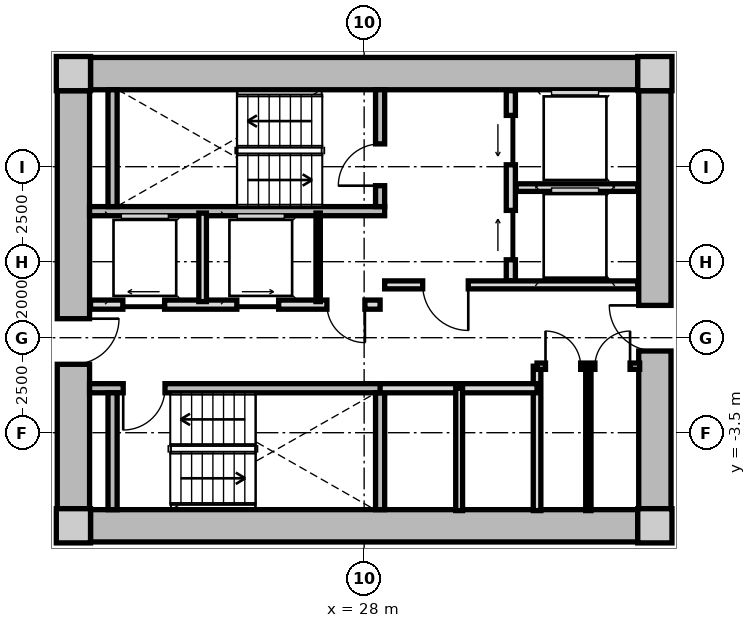
"""IFC4 building model, lengths in metres.
Left out: names, types, materials, properties, quantities, classifications, styles, units other than length and angle.
Written with IfcOpenShell. Run it as: python <this file> out.ifc"""

import sys

from ifc_helpers import new_model, si_unit, direction, frame, frame_2d, origin, origin_2d, place, context, subcontext, project, spatial, rectangle, extrude, source, transform, mapped, element, fill, save


model = new_model("IFC4")
c1 = context("Model", 3, precision=1e-05, world=origin(), true_north=direction((0.0, 1.0)))
c2 = subcontext(c1, "Body", "Model", "MODEL_VIEW")
j1 = project(units=[si_unit("LENGTHUNIT", "METRE"), si_unit("PLANEANGLEUNIT", "RADIAN")], contexts=[c1])
p1 = place(None, origin())
s1 = spatial("IfcSite", under=j1, at=p1, CompositionType="ELEMENT")
p2 = place(p1, origin())
s2 = spatial("IfcBuilding", under=s1, at=p2, CompositionType="ELEMENT")
p3 = place(p2, frame((0.0, 0.0, 67.35)))
s3 = spatial("IfcBuildingStorey", under=s2, at=p3, CompositionType="ELEMENT", Elevation=67.35)
m1 = source(origin(), c2, "Body", "SweptSolid", [
    extrude(rectangle(XDim=0.9, YDim=0.9, at=origin_2d()), origin(), (0.0, 0.0, 1.0), 3.05),
])
for number, where, z_axis, x_axis in (
    (1, (20.35, -5.95, 0.0), (0.0, 0.0, 1.0), (1.0, 0.0, 0.0)),
    (2, (35.65, -5.95, 0.0), (0.0, 0.0, 1.0), (1.0, 0.0, 0.0)),
    (3, (35.65, 5.95, 0.0), (0.0, 0.0, 1.0), (1.0, 0.0, 0.0)),
    (4, (20.35, 5.95, 0.0), (0.0, 0.0, 1.0), (1.0, 0.0, 0.0)),
):
    element("IfcColumn", number, at=place(p3, frame(where, z_axis=z_axis, x_axis=x_axis)), inside=s3, PredefinedType="COLUMN", context=c2, shape_type="MappedRepresentation", body=[
        mapped(m1, transform((0.0, 0.0, 0.0), x_axis=(1.0, 0.0, 0.0), y_axis=(0.0, 1.0, 0.0), z_axis=(0.0, 0.0, 1.0), scale=1.0)),
    ])
m2 = source(origin(), c2, "Body", "SweptSolid", [
    extrude(rectangle(XDim=14.4, YDim=0.85, at=frame_2d((7.2, 0.0))), origin(), (0.0, 0.0, 1.0), 2.79),
])
for number, where, z_axis, x_axis in (
    (5, (20.8, 5.95, 0.0), (0.0, 0.0, 1.0), (1.0, 0.0, 0.0)),
    (6, (35.2, -5.95, 0.0), (0.0, 0.0, 1.0), (-1.0, 0.0, 0.0)),
):
    element("IfcWall", number, at=place(p3, frame(where, z_axis=z_axis, x_axis=x_axis)), inside=s3, PredefinedType="SHEAR", context=c2, shape_type="MappedRepresentation", body=[
        mapped(m2, transform((0.0, 0.0, 0.0), x_axis=(1.0, 0.0, 0.0), y_axis=(0.0, 1.0, 0.0), z_axis=(0.0, 0.0, 1.0), scale=1.0)),
    ])
m3 = source(origin(), c2, "Body", "SweptSolid", [
    extrude(rectangle(XDim=11.0, YDim=0.85, at=frame_2d((5.5, 0.0))), origin(), (0.0, 0.0, 1.0), 2.79),
])
p4 = place(p3, frame((20.35, -5.5, 0.0), z_axis=(0.0, 0.0, 1.0), x_axis=(0.0, 1.0, 0.0)))
e7 = element("IfcWall", 7, at=p4, inside=s3, PredefinedType="SHEAR", context=c2, shape_type="MappedRepresentation", body=[
    mapped(m3, transform((0.0, 0.0, 0.0), x_axis=(1.0, 0.0, 0.0), y_axis=(0.0, 1.0, 0.0), z_axis=(0.0, 0.0, 1.0), scale=1.0)),
])
p5 = place(p4, frame((3.8, 0.0, 0.0)))
e8 = element("IfcOpeningElement", 8, at=p5, cuts=e7, PredefinedType="OPENING", context=c2, shape_type="SweptSolid", body=[
    extrude(rectangle(XDim=1.2, YDim=2.15, at=frame_2d((0.6, 1.075))), frame((0.0, 0.435, 0.0), z_axis=(0.0, -1.0, 0.0), x_axis=(1.0, 0.0, 0.0)), (0.0, 0.0, 1.0), 0.87),
])
p6 = place(p3, frame((35.65, 5.5, 0.0), z_axis=(0.0, 0.0, 1.0), x_axis=(0.0, -1.0, 0.0)))
e9 = element("IfcWall", 9, at=p6, inside=s3, PredefinedType="SHEAR", context=c2, shape_type="MappedRepresentation", body=[
    mapped(m3, transform((0.0, 0.0, 0.0), x_axis=(1.0, 0.0, 0.0), y_axis=(0.0, 1.0, 0.0), z_axis=(0.0, 0.0, 1.0), scale=1.0)),
])
p7 = place(p6, frame((5.65, 0.0, 0.0)))
e10 = element("IfcOpeningElement", 10, at=p7, cuts=e9, PredefinedType="OPENING", context=c2, shape_type="SweptSolid", body=[
    extrude(rectangle(XDim=1.2, YDim=2.15, at=frame_2d((0.6, 1.075))), frame((0.0, 0.435, 0.0), z_axis=(0.0, -1.0, 0.0), x_axis=(1.0, 0.0, 0.0)), (0.0, 0.0, 1.0), 0.87),
])
m4 = source(origin(), c2, "Body", "SweptSolid", [
    extrude(rectangle(XDim=7.765, YDim=0.24, at=frame_2d((3.883, 0.0))), origin(), (0.0, 0.0, 1.0), 2.79),
])
p8 = place(p3, frame((20.775, 2.33, 0.0), z_axis=(0.0, 0.0, 1.0), x_axis=(1.0, 0.0, 0.0)))
e11 = element("IfcWall", 11, at=p8, inside=s3, PredefinedType="PARTITIONING", context=c2, shape_type="MappedRepresentation", body=[
    mapped(m4, transform((0.0, 0.0, 0.0), x_axis=(1.0, 0.0, 0.0), y_axis=(0.0, 1.0, 0.0), z_axis=(0.0, 0.0, 1.0), scale=1.0)),
])
m5 = source(origin(), c2, "Body", "SweptSolid", [
    extrude(rectangle(XDim=3.075, YDim=0.24, at=frame_2d((1.538, 0.0))), origin(), (0.0, 0.0, 1.0), 2.79),
])
p9 = place(p3, frame((21.38, 2.45, 0.0), z_axis=(0.0, 0.0, 1.0), x_axis=(0.0, 1.0, 0.0)))
e12 = element("IfcWall", 12, at=p9, inside=s3, PredefinedType="PARTITIONING", context=c2, shape_type="MappedRepresentation", body=[
    mapped(m5, transform((0.0, 0.0, 0.0), x_axis=(1.0, 0.0, 0.0), y_axis=(0.0, 1.0, 0.0), z_axis=(0.0, 0.0, 1.0), scale=1.0)),
])
p10 = place(p3, frame((28.42, 2.45, 0.0), z_axis=(0.0, 0.0, 1.0), x_axis=(0.0, 1.0, 0.0)))
e13 = element("IfcWall", 13, at=p10, inside=s3, PredefinedType="PARTITIONING", context=c2, shape_type="MappedRepresentation", body=[
    mapped(m5, transform((0.0, 0.0, 0.0), x_axis=(1.0, 0.0, 0.0), y_axis=(0.0, 1.0, 0.0), z_axis=(0.0, 0.0, 1.0), scale=1.0)),
])
p11 = place(p10, frame((0.55, 0.0, 0.0)))
e14 = element("IfcOpeningElement", 14, at=p11, cuts=e13, PredefinedType="OPENING", context=c2, shape_type="SweptSolid", body=[
    extrude(rectangle(XDim=1.1, YDim=2.15, at=frame_2d((0.55, 1.075))), frame((0.0, 0.13, 0.0), z_axis=(0.0, -1.0, 0.0), x_axis=(1.0, 0.0, 0.0)), (0.0, 0.0, 1.0), 0.26),
])
p12 = place(p3, frame((20.775, -2.33, 0.0), z_axis=(0.0, 0.0, 1.0), x_axis=(1.0, 0.0, 0.0)))
e15 = element("IfcWall", 15, at=p12, inside=s3, PredefinedType="PARTITIONING", context=c2, shape_type="MappedRepresentation", body=[
    mapped(m4, transform((0.0, 0.0, 0.0), x_axis=(1.0, 0.0, 0.0), y_axis=(0.0, 1.0, 0.0), z_axis=(0.0, 0.0, 1.0), scale=1.0)),
])
p13 = place(p12, frame((0.885, 0.0, 0.0)))
e16 = element("IfcOpeningElement", 16, at=p13, cuts=e15, PredefinedType="OPENING", context=c2, shape_type="SweptSolid", body=[
    extrude(rectangle(XDim=1.1, YDim=2.15, at=frame_2d((0.55, 1.075))), frame((0.0, 0.13, 0.0), z_axis=(0.0, -1.0, 0.0), x_axis=(1.0, 0.0, 0.0)), (0.0, 0.0, 1.0), 0.26),
])
for number, where, z_axis, x_axis in (
    (17, (21.38, -5.525, 0.0), (0.0, 0.0, 1.0), (0.0, 1.0, 0.0)),
    (18, (28.42, -5.525, 0.0), (0.0, 0.0, 1.0), (0.0, 1.0, 0.0)),
):
    element("IfcWall", number, at=place(p3, frame(where, z_axis=z_axis, x_axis=x_axis)), inside=s3, PredefinedType="PARTITIONING", context=c2, shape_type="MappedRepresentation", body=[
        mapped(m5, transform((0.0, 0.0, 0.0), x_axis=(1.0, 0.0, 0.0), y_axis=(0.0, 1.0, 0.0), z_axis=(0.0, 0.0, 1.0), scale=1.0)),
    ])
m6 = source(origin(), c2, "Body", "SweptSolid", [
    extrude(rectangle(XDim=5.0, YDim=0.24, at=frame_2d((2.5, 0.0))), origin(), (0.0, 0.0, 1.0), 2.775),
])
p14 = place(p3, frame((31.86, 0.5, 0.0), z_axis=(0.0, 0.0, 1.0), x_axis=(0.0, 1.0, 0.0)))
e19 = element("IfcWall", 19, at=p14, inside=s3, PredefinedType="PARTITIONING", context=c2, shape_type="MappedRepresentation", body=[
    mapped(m6, transform((0.0, 0.0, 0.0), x_axis=(1.0, 0.0, 0.0), y_axis=(0.0, 1.0, 0.0), z_axis=(0.0, 0.0, 1.0), scale=1.0)),
])
p15 = place(p14, frame((3.05, 0.0, 0.0)))
e20 = element("IfcOpeningElement", 20, at=p15, cuts=e19, PredefinedType="OPENING", context=c2, shape_type="SweptSolid", body=[
    extrude(rectangle(XDim=1.3, YDim=2.2, at=frame_2d((0.65, 1.1))), frame((0.0, 0.13, 0.0), z_axis=(0.0, -1.0, 0.0), x_axis=(1.0, 0.0, 0.0)), (0.0, 0.0, 1.0), 0.26),
])
p16 = place(p14, frame((0.55, 0.0, 0.0)))
e21 = element("IfcOpeningElement", 21, at=p16, cuts=e19, PredefinedType="OPENING", context=c2, shape_type="SweptSolid", body=[
    extrude(rectangle(XDim=1.3, YDim=2.2, at=frame_2d((0.65, 1.1))), frame((0.0, 0.13, 0.0), z_axis=(0.0, -1.0, 0.0), x_axis=(1.0, 0.0, 0.0)), (0.0, 0.0, 1.0), 0.26),
])
m7 = source(origin(), c2, "Body", "SweptSolid", [
    extrude(rectangle(XDim=3.2, YDim=0.2, at=frame_2d((1.6, 0.0))), origin(), (0.0, 0.0, 1.0), 2.775),
])
p17 = place(p3, frame((32.0, 2.95, 0.0), z_axis=(0.0, 0.0, 1.0), x_axis=(1.0, 0.0, 0.0)))
e22 = element("IfcWall", 22, at=p17, inside=s3, PredefinedType="PARTITIONING", context=c2, shape_type="MappedRepresentation", body=[
    mapped(m7, transform((0.0, 0.0, 0.0), x_axis=(1.0, 0.0, 0.0), y_axis=(0.0, 1.0, 0.0), z_axis=(0.0, 0.0, 1.0), scale=1.0)),
])
m8 = source(origin(), c2, "Body", "SweptSolid", [
    extrude(rectangle(XDim=6.66, YDim=0.21, at=frame_2d((3.33, 0.0))), origin(), (0.0, 0.0, 1.0), 2.775),
])
p18 = place(p3, frame((28.54, 0.39, 0.0), z_axis=(0.0, 0.0, 1.0), x_axis=(1.0, 0.0, 0.0)))
e23 = element("IfcWall", 23, at=p18, inside=s3, PredefinedType="PARTITIONING", context=c2, shape_type="MappedRepresentation", body=[
    mapped(m8, transform((0.0, 0.0, 0.0), x_axis=(1.0, 0.0, 0.0), y_axis=(0.0, 1.0, 0.0), z_axis=(0.0, 0.0, 1.0), scale=1.0)),
])
p19 = place(p18, frame((1.0, 0.0, 0.0)))
e24 = element("IfcOpeningElement", 24, at=p19, cuts=e23, PredefinedType="OPENING", context=c2, shape_type="SweptSolid", body=[
    extrude(rectangle(XDim=1.2, YDim=2.15, at=frame_2d((0.6, 1.075))), frame((0.0, 0.115, 0.0), z_axis=(0.0, -1.0, 0.0), x_axis=(1.0, 0.0, 0.0)), (0.0, 0.0, 1.0), 0.23),
])
m9 = source(origin(), c2, "Body", "SweptSolid", [
    extrude(rectangle(XDim=7.62, YDim=0.24, at=frame_2d((3.81, 0.0))), origin(), (0.0, 0.0, 1.0), 2.775),
])
p20 = place(p3, frame((20.8, -0.13, 0.0), z_axis=(0.0, 0.0, 1.0), x_axis=(1.0, 0.0, 0.0)))
e25 = element("IfcWall", 25, at=p20, inside=s3, PredefinedType="PARTITIONING", context=c2, shape_type="MappedRepresentation", body=[
    mapped(m9, transform((0.0, 0.0, 0.0), x_axis=(1.0, 0.0, 0.0), y_axis=(0.0, 1.0, 0.0), z_axis=(0.0, 0.0, 1.0), scale=1.0)),
])
p21 = place(p20, frame((6.22, 0.0, 0.0)))
e26 = element("IfcOpeningElement", 26, at=p21, cuts=e25, PredefinedType="OPENING", context=c2, shape_type="SweptSolid", body=[
    extrude(rectangle(XDim=1.0, YDim=2.1, at=frame_2d((0.5, 1.05))), frame((0.0, 0.13, 0.0), z_axis=(0.0, -1.0, 0.0), x_axis=(1.0, 0.0, 0.0)), (0.0, 0.0, 1.0), 0.26),
])
p22 = place(p20, frame((0.85, 0.0, 0.0)))
e27 = element("IfcOpeningElement", 27, at=p22, cuts=e25, PredefinedType="OPENING", context=c2, shape_type="SweptSolid", body=[
    extrude(rectangle(XDim=1.1, YDim=2.2, at=frame_2d((0.55, 1.1))), frame((0.0, 0.13, 0.0), z_axis=(0.0, -1.0, 0.0), x_axis=(1.0, 0.0, 0.0)), (0.0, 0.0, 1.0), 0.26),
])
p23 = place(p20, frame((3.85, 0.0, 0.0)))
e28 = element("IfcOpeningElement", 28, at=p23, cuts=e25, PredefinedType="OPENING", context=c2, shape_type="SweptSolid", body=[
    extrude(rectangle(XDim=1.1, YDim=2.2, at=frame_2d((0.55, 1.1))), frame((0.0, 0.13, 0.0), z_axis=(0.0, -1.0, 0.0), x_axis=(1.0, 0.0, 0.0)), (0.0, 0.0, 1.0), 0.26),
])
m10 = source(origin(), c2, "Body", "SweptSolid", [
    extrude(rectangle(XDim=2.33, YDim=0.115, at=frame_2d((1.165, 0.0))), origin(), (0.0, 0.0, 1.0), 2.775),
])
p24 = place(p3, frame((26.79, -0.05, 0.0), z_axis=(0.0, 0.0, 1.0), x_axis=(0.0, 1.0, 0.0)))
e29 = element("IfcWall", 29, at=p24, inside=s3, PredefinedType="PARTITIONING", context=c2, shape_type="MappedRepresentation", body=[
    mapped(m10, transform((0.0, 0.0, 0.0), x_axis=(1.0, 0.0, 0.0), y_axis=(0.0, 1.0, 0.0), z_axis=(0.0, 0.0, 1.0), scale=1.0)),
])
m11 = source(origin(), c2, "Body", "SweptSolid", [
    extrude(rectangle(XDim=2.33, YDim=0.2, at=frame_2d((1.165, 0.0))), origin(), (0.0, 0.0, 1.0), 2.775),
])
p25 = place(p3, frame((23.75, -0.05, 0.0), z_axis=(0.0, 0.0, 1.0), x_axis=(0.0, 1.0, 0.0)))
e30 = element("IfcWall", 30, at=p25, inside=s3, PredefinedType="PARTITIONING", context=c2, shape_type="MappedRepresentation", body=[
    mapped(m11, transform((0.0, 0.0, 0.0), x_axis=(1.0, 0.0, 0.0), y_axis=(0.0, 1.0, 0.0), z_axis=(0.0, 0.0, 1.0), scale=1.0)),
])
m12 = source(origin(), c2, "Body", "SweptSolid", [
    extrude(rectangle(XDim=3.8, YDim=0.2, at=frame_2d((1.9, 0.0))), origin(), (0.0, 0.0, 1.0), 2.775),
])
p26 = place(p3, frame((32.55, -5.55, 0.0), z_axis=(0.0, 0.0, 1.0), x_axis=(0.0, 1.0, 0.0)))
e31 = element("IfcWall", 31, at=p26, inside=s3, PredefinedType="PARTITIONING", context=c2, shape_type="MappedRepresentation", body=[
    mapped(m12, transform((0.0, 0.0, 0.0), x_axis=(1.0, 0.0, 0.0), y_axis=(0.0, 1.0, 0.0), z_axis=(0.0, 0.0, 1.0), scale=1.0)),
])
m13 = source(origin(), c2, "Body", "SweptSolid", [
    extrude(rectangle(XDim=4.13, YDim=0.24, at=frame_2d((2.065, 0.0))), origin(), (0.0, 0.0, 1.0), 2.775),
])
p27 = place(p3, frame((28.42, -2.33, 0.0), z_axis=(0.0, 0.0, 1.0), x_axis=(1.0, 0.0, 0.0)))
e32 = element("IfcWall", 32, at=p27, inside=s3, PredefinedType="PARTITIONING", context=c2, shape_type="MappedRepresentation", body=[
    mapped(m13, transform((0.0, 0.0, 0.0), x_axis=(1.0, 0.0, 0.0), y_axis=(0.0, 1.0, 0.0), z_axis=(0.0, 0.0, 1.0), scale=1.0)),
])
m14 = source(origin(), c2, "Body", "SweptSolid", [
    extrude(rectangle(XDim=3.22, YDim=0.18, at=frame_2d((1.61, 0.0))), origin(), (0.0, 0.0, 1.0), 2.775),
])
p28 = place(p3, frame((30.5, -5.55, 0.0), z_axis=(0.0, 0.0, 1.0), x_axis=(0.0, 1.0, 0.0)))
e33 = element("IfcWall", 33, at=p28, inside=s3, PredefinedType="PARTITIONING", context=c2, shape_type="MappedRepresentation", body=[
    mapped(m14, transform((0.0, 0.0, 0.0), x_axis=(1.0, 0.0, 0.0), y_axis=(0.0, 1.0, 0.0), z_axis=(0.0, 0.0, 1.0), scale=1.0)),
])
m15 = source(origin(), c2, "Body", "SweptSolid", [
    extrude(rectangle(XDim=2.7, YDim=0.165, at=frame_2d((1.35, 0.0))), origin(), (0.0, 0.0, 1.0), 2.775),
])
p29 = place(p3, frame((32.55, -1.75, 0.0), z_axis=(0.0, 0.0, 1.0), x_axis=(1.0, 0.0, 0.0)))
e34 = element("IfcWall", 34, at=p29, inside=s3, PredefinedType="PARTITIONING", context=c2, shape_type="MappedRepresentation", body=[
    mapped(m15, transform((0.0, 0.0, 0.0), x_axis=(1.0, 0.0, 0.0), y_axis=(0.0, 1.0, 0.0), z_axis=(0.0, 0.0, 1.0), scale=1.0)),
])
p30 = place(p29, frame((0.222, 0.0, 0.0)))
e35 = element("IfcOpeningElement", 35, at=p30, cuts=e34, PredefinedType="OPENING", context=c2, shape_type="SweptSolid", body=[
    extrude(rectangle(XDim=0.925, YDim=2.1, at=frame_2d((0.462, 1.05))), frame((0.0, 0.093, 0.0), z_axis=(0.0, -1.0, 0.0), x_axis=(1.0, 0.0, 0.0)), (0.0, 0.0, 1.0), 0.185),
])
p31 = place(p29, frame((1.522, 0.0, 0.0)))
e36 = element("IfcOpeningElement", 36, at=p31, cuts=e34, PredefinedType="OPENING", context=c2, shape_type="SweptSolid", body=[
    extrude(rectangle(XDim=0.925, YDim=2.1, at=frame_2d((0.462, 1.05))), frame((0.0, 0.093, 0.0), z_axis=(0.0, -1.0, 0.0), x_axis=(1.0, 0.0, 0.0)), (0.0, 0.0, 1.0), 0.185),
])
m16 = source(origin(), c2, "Body", "SweptSolid", [
    extrude(rectangle(XDim=3.8, YDim=0.14, at=frame_2d((1.9, 0.0))), origin(), (0.0, 0.0, 1.0), 2.775),
])
p32 = place(p3, frame((33.9, -5.55, 0.0), z_axis=(0.0, 0.0, 1.0), x_axis=(0.0, 1.0, 0.0)))
e37 = element("IfcWall", 37, at=p32, inside=s3, PredefinedType="PARTITIONING", context=c2, shape_type="MappedRepresentation", body=[
    mapped(m16, transform((0.0, 0.0, 0.0), x_axis=(1.0, 0.0, 0.0), y_axis=(0.0, 1.0, 0.0), z_axis=(0.0, 0.0, 1.0), scale=1.0)),
])
m17 = source(origin(), c2, "Body", "SweptSolid", [
    extrude(rectangle(XDim=1.1, YDim=2.15, at=frame_2d((0.55, 1.075))), frame((0.0, 0.025, 0.0), z_axis=(0.0, -1.0, 0.0), x_axis=(1.0, 0.0, 0.0)), (0.0, 0.0, 1.0), 0.05),
])
p33 = place(p11, origin())
e38 = element("IfcDoor", 38, at=p33, inside=s3, OperationType="SINGLE_SWING_LEFT", PredefinedType="DOOR", context=c2, shape_type="MappedRepresentation", body=[
    mapped(m17, transform((0.0, 0.0, 0.0), x_axis=(1.0, 0.0, 0.0), y_axis=(0.0, 1.0, 0.0), z_axis=(0.0, 0.0, 1.0), scale=1.0)),
])
fill(e14, e38)
p34 = place(p13, frame((1.1, 0.0, 0.0), z_axis=(0.0, 0.0, 1.0), x_axis=(-1.0, 0.0, 0.0)))
e39 = element("IfcDoor", 39, at=p34, inside=s3, OperationType="SINGLE_SWING_RIGHT", PredefinedType="DOOR", context=c2, shape_type="MappedRepresentation", body=[
    mapped(m17, transform((0.0, 0.0, 0.0), x_axis=(1.0, 0.0, 0.0), y_axis=(0.0, 1.0, 0.0), z_axis=(0.0, 0.0, 1.0), scale=1.0)),
])
fill(e16, e39)
m18 = source(origin(), c2, "Body", "SweptSolid", [
    extrude(rectangle(XDim=1.3, YDim=2.2, at=frame_2d((0.65, 1.1))), frame((0.0, 0.025, 0.0), z_axis=(0.0, -1.0, 0.0), x_axis=(1.0, 0.0, 0.0)), (0.0, 0.0, 1.0), 0.05),
])
p35 = place(p15, origin())
e40 = element("IfcDoor", 40, at=p35, inside=s3, OperationType="SLIDING_TO_LEFT", PredefinedType="DOOR", context=c2, shape_type="MappedRepresentation", body=[
    mapped(m18, transform((0.0, 0.0, 0.0), x_axis=(1.0, 0.0, 0.0), y_axis=(0.0, 1.0, 0.0), z_axis=(0.0, 0.0, 1.0), scale=1.0)),
])
fill(e20, e40)
p36 = place(p16, origin())
e41 = element("IfcDoor", 41, at=p36, inside=s3, OperationType="SLIDING_TO_RIGHT", PredefinedType="DOOR", context=c2, shape_type="MappedRepresentation", body=[
    mapped(m18, transform((0.0, 0.0, 0.0), x_axis=(1.0, 0.0, 0.0), y_axis=(0.0, 1.0, 0.0), z_axis=(0.0, 0.0, 1.0), scale=1.0)),
])
fill(e21, e41)
m19 = source(origin(), c2, "Body", "SweptSolid", [
    extrude(rectangle(XDim=1.2, YDim=2.15, at=frame_2d((0.6, 1.075))), frame((0.0, 0.025, 0.0), z_axis=(0.0, -1.0, 0.0), x_axis=(1.0, 0.0, 0.0)), (0.0, 0.0, 1.0), 0.05),
])
p37 = place(p19, frame((1.2, 0.0, 0.0), z_axis=(0.0, 0.0, 1.0), x_axis=(-1.0, 0.0, 0.0)))
e42 = element("IfcDoor", 42, at=p37, inside=s3, OperationType="SINGLE_SWING_LEFT", PredefinedType="DOOR", context=c2, shape_type="MappedRepresentation", body=[
    mapped(m19, transform((0.0, 0.0, 0.0), x_axis=(1.0, 0.0, 0.0), y_axis=(0.0, 1.0, 0.0), z_axis=(0.0, 0.0, 1.0), scale=1.0)),
])
fill(e24, e42)
p38 = place(p5, frame((1.2, 0.0, 0.0), z_axis=(0.0, 0.0, 1.0), x_axis=(-1.0, 0.0, 0.0)))
e43 = element("IfcDoor", 43, at=p38, inside=s3, OperationType="SINGLE_SWING_LEFT", PredefinedType="DOOR", context=c2, shape_type="MappedRepresentation", body=[
    mapped(m19, transform((0.0, 0.0, 0.0), x_axis=(1.0, 0.0, 0.0), y_axis=(0.0, 1.0, 0.0), z_axis=(0.0, 0.0, 1.0), scale=1.0)),
])
fill(e8, e43)
p39 = place(p7, frame((1.2, 0.0, 0.0), z_axis=(0.0, 0.0, 1.0), x_axis=(-1.0, 0.0, 0.0)))
e44 = element("IfcDoor", 44, at=p39, inside=s3, OperationType="SINGLE_SWING_RIGHT", PredefinedType="DOOR", context=c2, shape_type="MappedRepresentation", body=[
    mapped(m19, transform((0.0, 0.0, 0.0), x_axis=(1.0, 0.0, 0.0), y_axis=(0.0, 1.0, 0.0), z_axis=(0.0, 0.0, 1.0), scale=1.0)),
])
fill(e10, e44)
m20 = source(origin(), c2, "Body", "SweptSolid", [
    extrude(rectangle(XDim=1.0, YDim=2.1, at=frame_2d((0.5, 1.05))), frame((0.0, 0.025, 0.0), z_axis=(0.0, -1.0, 0.0), x_axis=(1.0, 0.0, 0.0)), (0.0, 0.0, 1.0), 0.05),
])
p40 = place(p21, frame((1.0, 0.0, 0.0), z_axis=(0.0, 0.0, 1.0), x_axis=(-1.0, 0.0, 0.0)))
e45 = element("IfcDoor", 45, at=p40, inside=s3, OperationType="SINGLE_SWING_LEFT", PredefinedType="DOOR", context=c2, shape_type="MappedRepresentation", body=[
    mapped(m20, transform((0.0, 0.0, 0.0), x_axis=(1.0, 0.0, 0.0), y_axis=(0.0, 1.0, 0.0), z_axis=(0.0, 0.0, 1.0), scale=1.0)),
])
fill(e26, e45)
m21 = source(origin(), c2, "Body", "SweptSolid", [
    extrude(rectangle(XDim=1.1, YDim=2.2, at=frame_2d((0.55, 1.1))), frame((0.0, 0.025, 0.0), z_axis=(0.0, -1.0, 0.0), x_axis=(1.0, 0.0, 0.0)), (0.0, 0.0, 1.0), 0.05),
])
p41 = place(p22, origin())
e46 = element("IfcDoor", 46, at=p41, inside=s3, OperationType="SLIDING_TO_LEFT", PredefinedType="DOOR", context=c2, shape_type="MappedRepresentation", body=[
    mapped(m21, transform((0.0, 0.0, 0.0), x_axis=(1.0, 0.0, 0.0), y_axis=(0.0, 1.0, 0.0), z_axis=(0.0, 0.0, 1.0), scale=1.0)),
])
fill(e27, e46)
p42 = place(p23, origin())
e47 = element("IfcDoor", 47, at=p42, inside=s3, OperationType="SLIDING_TO_RIGHT", PredefinedType="DOOR", context=c2, shape_type="MappedRepresentation", body=[
    mapped(m21, transform((0.0, 0.0, 0.0), x_axis=(1.0, 0.0, 0.0), y_axis=(0.0, 1.0, 0.0), z_axis=(0.0, 0.0, 1.0), scale=1.0)),
])
fill(e28, e47)
m22 = source(origin(), c2, "Body", "SweptSolid", [
    extrude(rectangle(XDim=0.925, YDim=2.1, at=frame_2d((0.462, 1.05))), frame((0.0, 0.025, 0.0), z_axis=(0.0, -1.0, 0.0), x_axis=(1.0, 0.0, 0.0)), (0.0, 0.0, 1.0), 0.05),
])
p43 = place(p30, origin())
e48 = element("IfcDoor", 48, at=p43, inside=s3, OperationType="SINGLE_SWING_LEFT", PredefinedType="DOOR", context=c2, shape_type="MappedRepresentation", body=[
    mapped(m22, transform((0.0, 0.0, 0.0), x_axis=(1.0, 0.0, 0.0), y_axis=(0.0, 1.0, 0.0), z_axis=(0.0, 0.0, 1.0), scale=1.0)),
])
fill(e35, e48)
p44 = place(p31, origin())
e49 = element("IfcDoor", 49, at=p44, inside=s3, OperationType="SINGLE_SWING_RIGHT", PredefinedType="DOOR", context=c2, shape_type="MappedRepresentation", body=[
    mapped(m22, transform((0.0, 0.0, 0.0), x_axis=(1.0, 0.0, 0.0), y_axis=(0.0, 1.0, 0.0), z_axis=(0.0, 0.0, 1.0), scale=1.0)),
])
fill(e36, e49)
save(model, sys.argv[1])
